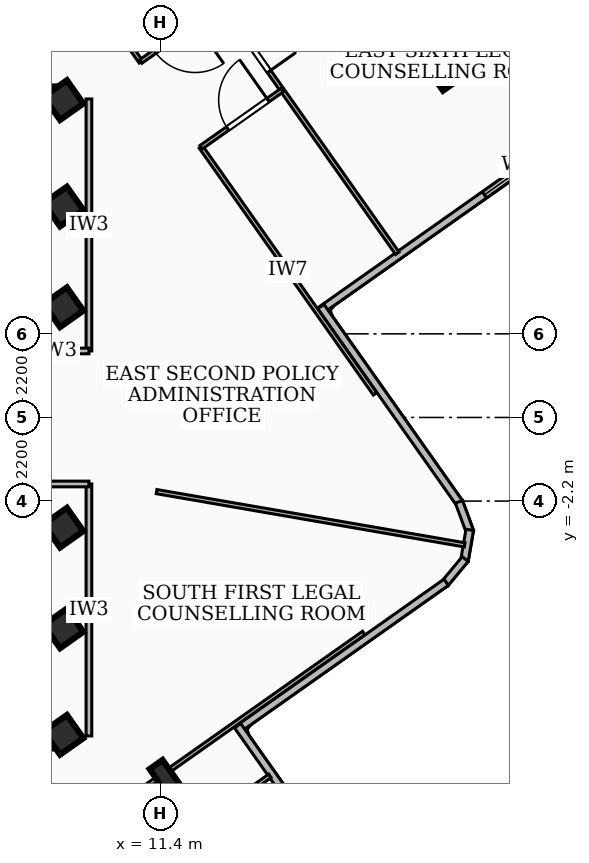
"""IFC4 building model, lengths in metres.
Left out: names, types, materials, properties, quantities, classifications, styles, units other than length and angle.
Written with IfcOpenShell. Run it as: python <this file> out.ifc"""

import sys

from ifc_helpers import new_model, si_unit, direction, frame, frame_2d, origin, origin_2d, place, context, subcontext, project, spatial, rectangle, i_section, extrude, element, fill, save


model = new_model("IFC4")
c1 = context("Model", 3, precision=1e-05, world=origin(), true_north=direction((0.0, 1.0)))
c2 = subcontext(c1, "Body", "Model", "MODEL_VIEW")
j1 = project(units=[si_unit("LENGTHUNIT", "METRE"), si_unit("PLANEANGLEUNIT", "RADIAN")], contexts=[c1])
p1 = place(None, origin())
s1 = spatial("IfcSite", under=j1, at=p1, CompositionType="ELEMENT")
p2 = place(p1, origin())
s2 = spatial("IfcBuilding", under=s1, at=p2, CompositionType="ELEMENT")
p3 = place(p2, frame((0.0, 0.0, 225.72)))
s3 = spatial("IfcBuildingStorey", under=s2, at=p3, CompositionType="ELEMENT", Elevation=225.72)
for number, where, z_axis, x_axis in (
    (1, (-8.78, 8.51, 0.0), (0.0, 0.0, 1.0), (1.0, 0.0, 0.0)),
    (2, (8.78, -8.51, 0.0), (0.0, 0.0, 1.0), (-1.0, 0.0, 0.0)),
):
    element("IfcWall", number, at=place(p3, frame(where, z_axis=z_axis, x_axis=x_axis)), inside=s3, PredefinedType="SHEAR", context=c2, shape_type="SweptSolid", body=[
        extrude(rectangle(XDim=17.56, YDim=0.4, at=frame_2d((8.78, 0.0))), origin(), (0.0, 0.0, 1.0), 3.14),
    ])
for number, where, z_axis, x_axis in (
    (3, (8.85, -5.55, 0.0), (0.0, 0.0, 1.0), (0.817, 0.576, 0.0)),
    (4, (8.85, -2.9, 0.0), (0.0, 0.0, 1.0), (0.817, 0.576, 0.0)),
    (5, (8.85, 2.9, 0.0), (0.0, 0.0, 1.0), (0.817, 0.576, 0.0)),
    (6, (8.85, 5.55, 0.0), (0.0, 0.0, 1.0), (0.817, 0.576, 0.0)),
    (7, (8.85, -8.35, 0.0), (0.0, 0.0, 1.0), (0.817, 0.576, 0.0)),
    (8, (8.85, 8.35, 0.0), (0.0, 0.0, 1.0), (0.817, 0.576, 0.0)),
):
    element("IfcColumn", number, at=place(p3, frame(where, z_axis=z_axis, x_axis=x_axis)), inside=s3, PredefinedType="COLUMN", context=c2, shape_type="SweptSolid", body=[
        extrude(rectangle(XDim=0.75, YDim=0.75, at=origin_2d()), origin(), (0.0, 0.0, 1.0), 3.42),
    ])
for number, where, z_axis, x_axis in (
    (9, (18.741, 9.097, 0.0), (0.0, 0.0, 1.0), (0.817, 0.576, 0.0)),
    (10, (11.554, -9.51, 0.0), (0.0, 0.0, 1.0), (0.817, 0.576, 0.0)),
):
    element("IfcColumn", number, at=place(p3, frame(where, z_axis=z_axis, x_axis=x_axis)), inside=s3, PredefinedType="COLUMN", context=c2, shape_type="SweptSolid", body=[
        extrude(i_section(OverallWidth=0.418, OverallDepth=0.927, WebThickness=0.019, FlangeThickness=0.032, at=origin_2d()), origin(), (0.0, 0.0, 1.0), 3.42),
    ])
p4 = place(p3, frame((22.829, 7.905, 0.0), z_axis=(0.0, 0.0, 1.0), x_axis=(-0.817135410946, -0.576445765166, 0.0)))
e11 = element("IfcWall", 11, at=p4, inside=s3, PredefinedType="SOLIDWALL", context=c2, shape_type="SweptSolid", body=[
    extrude(rectangle(XDim=8.842, YDim=0.2, at=frame_2d((4.421, 0.0))), origin(), (0.0, 0.0, 1.0), 3.14),
])
p5 = place(p4, frame((0.85, 0.0, 0.85)))
e12 = element("IfcOpeningElement", 12, at=p5, cuts=e11, PredefinedType="OPENING", context=c2, shape_type="SweptSolid", body=[
    extrude(rectangle(XDim=2.7, YDim=2.1, at=frame_2d((1.35, 1.05))), frame((0.0, 0.11, 0.0), z_axis=(0.0, -1.0, 0.0), x_axis=(1.0, 0.0, 0.0)), (0.0, 0.0, 1.0), 0.22),
])
p6 = place(p3, frame((15.623, 2.919, 0.0), z_axis=(0.0, 0.0, 1.0), x_axis=(0.576566796686, -0.817050016192, 0.0)))
e13 = element("IfcWall", 13, at=p6, inside=s3, PredefinedType="SOLIDWALL", context=c2, shape_type="SweptSolid", body=[
    extrude(rectangle(XDim=6.341, YDim=0.2, at=frame_2d((3.17, 0.0))), origin(), (0.0, 0.0, 1.0), 3.14),
])
p7 = place(p3, frame((19.256, -2.219, 0.0), z_axis=(0.0, 0.0, 1.0), x_axis=(0.345975487894, -0.938243551417, 0.0)))
e14 = element("IfcWall", 14, at=p7, inside=s3, PredefinedType="SOLIDWALL", context=c2, shape_type="SweptSolid", body=[
    extrude(rectangle(XDim=0.838, YDim=0.2, at=frame_2d((0.419, 0.0))), origin(), (0.0, 0.0, 1.0), 3.14),
])
p8 = place(p3, frame((19.541, -2.957, 0.0), z_axis=(0.0, 0.0, 1.0), x_axis=(-0.169867275979, -0.985466949497, 0.0)))
e15 = element("IfcWall", 15, at=p8, inside=s3, PredefinedType="SOLIDWALL", context=c2, shape_type="SweptSolid", body=[
    extrude(rectangle(XDim=0.825, YDim=0.2, at=frame_2d((0.413, 0.0))), origin(), (0.0, 0.0, 1.0), 3.14),
])
p9 = place(p3, frame((19.421, -3.726, 0.0), z_axis=(0.0, 0.0, 1.0), x_axis=(-0.639610986305, -0.768698761673, 0.0)))
e16 = element("IfcWall", 16, at=p9, inside=s3, PredefinedType="SOLIDWALL", context=c2, shape_type="SweptSolid", body=[
    extrude(rectangle(XDim=0.838, YDim=0.2, at=frame_2d((0.419, 0.0))), origin(), (0.0, 0.0, 1.0), 3.14),
])
p10 = place(p3, frame((18.921, -4.337, 0.0), z_axis=(0.0, 0.0, 1.0), x_axis=(-0.817167578816, -0.576400163196, 0.0)))
e17 = element("IfcWall", 17, at=p10, inside=s3, PredefinedType="SOLIDWALL", context=c2, shape_type="SweptSolid", body=[
    extrude(rectangle(XDim=6.74, YDim=0.2, at=frame_2d((3.37, 0.0))), origin(), (0.0, 0.0, 1.0), 3.14),
])
p11 = place(p3, frame((13.432, -8.111, 0.0), z_axis=(0.0, 0.0, 1.0), x_axis=(0.576445639344, -0.817135499707, 0.0)))
e18 = element("IfcWall", 18, at=p11, inside=s3, PredefinedType="SOLIDWALL", context=c2, shape_type="SweptSolid", body=[
    extrude(rectangle(XDim=4.641, YDim=0.2, at=frame_2d((2.32, 0.0))), origin(), (0.0, 0.0, 1.0), 3.14),
])
p12 = place(p3, frame((9.52, 1.75, 0.0), z_axis=(0.0, 0.0, 1.0), x_axis=(0.0, 1.0, 0.0)))
e19 = element("IfcWall", 19, at=p12, inside=s3, PredefinedType="PARTITIONING", context=c2, shape_type="SweptSolid", body=[
    extrude(rectangle(XDim=6.63, YDim=0.15, at=frame_2d((3.315, 0.0))), origin(), (0.0, 0.0, 1.0), 2.51),
])
p13 = place(p3, frame((7.85, 1.75, 0.0), z_axis=(0.0, 0.0, 1.0), x_axis=(1.0, 0.0, 0.0)))
e20 = element("IfcWall", 20, at=p13, inside=s3, PredefinedType="PARTITIONING", context=c2, shape_type="SweptSolid", body=[
    extrude(rectangle(XDim=1.67, YDim=0.15, at=frame_2d((0.835, 0.0))), origin(), (0.0, 0.0, 1.0), 2.37),
])
p14 = place(p3, frame((9.52, -8.38, 0.0), z_axis=(0.0, 0.0, 1.0), x_axis=(0.0, 1.0, 0.0)))
e21 = element("IfcWall", 21, at=p14, inside=s3, PredefinedType="PARTITIONING", context=c2, shape_type="SweptSolid", body=[
    extrude(rectangle(XDim=6.63, YDim=0.15, at=frame_2d((3.315, 0.0))), origin(), (0.0, 0.0, 1.0), 3.14),
])
p15 = place(p3, frame((7.85, -1.75, 0.0), z_axis=(0.0, 0.0, 1.0), x_axis=(1.0, 0.0, 0.0)))
e22 = element("IfcWall", 22, at=p15, inside=s3, PredefinedType="PARTITIONING", context=c2, shape_type="SweptSolid", body=[
    extrude(rectangle(XDim=1.67, YDim=0.15, at=frame_2d((0.835, 0.0))), origin(), (0.0, 0.0, 1.0), 2.37),
])
p16 = place(p3, frame((11.3, -1.951, 0.0), z_axis=(0.0, 0.0, 1.0), x_axis=(0.985391330126, -0.170305391905, 0.0)))
e23 = element("IfcWall", 23, at=p16, inside=s3, PredefinedType="PARTITIONING", context=c2, shape_type="SweptSolid", body=[
    extrude(rectangle(XDim=8.227, YDim=0.11, at=frame_2d((4.114, 0.0))), origin(), (0.0, 0.0, 1.0), 3.14),
])
p17 = place(p3, frame((10.887, 9.357, 0.0), z_axis=(0.0, 0.0, 1.0), x_axis=(-0.576423728743, 0.817150956031, 0.0)))
e24 = element("IfcWall", 24, at=p17, inside=s3, PredefinedType="PARTITIONING", context=c2, shape_type="SweptSolid", body=[
    extrude(rectangle(XDim=8.35, YDim=0.11, at=frame_2d((4.175, 0.0))), origin(), (0.0, 0.0, 1.0), 2.51),
])
p18 = place(p3, frame((17.049, 0.621, 0.0), z_axis=(0.0, 0.0, 1.0), x_axis=(-0.57635038395, 0.817202689007, 0.0)))
e25 = element("IfcWall", 25, at=p18, inside=s3, PredefinedType="PARTITIONING", context=c2, shape_type="SweptSolid", body=[
    extrude(rectangle(XDim=7.95, YDim=0.11, at=frame_2d((3.975, 0.0))), origin(), (0.0, 0.0, 1.0), 3.14),
])
p19 = place(p3, frame((13.014, 10.869, 0.0), z_axis=(0.0, 0.0, 1.0), x_axis=(-0.817133808286, -0.576448036995, 0.0)))
e26 = element("IfcWall", 26, at=p19, inside=s3, PredefinedType="PARTITIONING", context=c2, shape_type="SweptSolid", body=[
    extrude(rectangle(XDim=2.609, YDim=0.11, at=frame_2d((1.304, 0.0))), origin(), (0.0, 0.0, 1.0), 3.14),
])
p20 = place(p19, frame((0.854, 0.0, 0.0)))
e27 = element("IfcOpeningElement", 27, at=p20, cuts=e26, PredefinedType="OPENING", context=c2, shape_type="SweptSolid", body=[
    extrude(rectangle(XDim=1.3, YDim=2.1, at=frame_2d((0.65, 1.05))), frame((0.0, 0.065, 0.0), z_axis=(0.0, -1.0, 0.0), x_axis=(1.0, 0.0, 0.0)), (0.0, 0.0, 1.0), 0.13),
])
p21 = place(p3, frame((12.472, 7.11, 0.0), z_axis=(0.0, 0.0, 1.0), x_axis=(0.81728919746, 0.576227704745, 0.0)))
e28 = element("IfcWall", 28, at=p21, inside=s3, PredefinedType="PARTITIONING", context=c2, shape_type="SweptSolid", body=[
    extrude(rectangle(XDim=2.61, YDim=0.11, at=frame_2d((1.305, 0.0))), origin(), (0.0, 0.0, 1.0), 3.14),
])
p22 = place(p21, frame((0.855, 0.0, 0.0)))
e29 = element("IfcOpeningElement", 29, at=p22, cuts=e28, PredefinedType="OPENING", context=c2, shape_type="SweptSolid", body=[
    extrude(rectangle(XDim=1.3, YDim=2.1, at=frame_2d((0.65, 1.05))), frame((0.0, 0.065, 0.0), z_axis=(0.0, -1.0, 0.0), x_axis=(1.0, 0.0, 0.0)), (0.0, 0.0, 1.0), 0.13),
])
p23 = place(p3, frame((10.215, 14.836, 0.0), z_axis=(0.0, 0.0, 1.0), x_axis=(0.576525296339, -0.817079300118, 0.0)))
e30 = element("IfcWall", 30, at=p23, inside=s3, PredefinedType="PARTITIONING", context=c2, shape_type="SweptSolid", body=[
    extrude(rectangle(XDim=12.87, YDim=0.11, at=frame_2d((6.435, 0.0))), origin(), (0.0, 0.0, 1.0), 2.51),
])
p24 = place(p23, frame((6.155, 0.0, 0.0)))
e31 = element("IfcOpeningElement", 31, at=p24, cuts=e30, PredefinedType="OPENING", context=c2, shape_type="SweptSolid", body=[
    extrude(rectangle(XDim=0.86, YDim=2.04, at=frame_2d((0.43, 1.02))), frame((0.0, 0.065, 0.0), z_axis=(0.0, -1.0, 0.0), x_axis=(1.0, 0.0, 0.0)), (0.0, 0.0, 1.0), 0.13),
])
p25 = place(p23, frame((4.955, 0.0, 0.0)))
e32 = element("IfcOpeningElement", 32, at=p25, cuts=e30, PredefinedType="OPENING", context=c2, shape_type="SweptSolid", body=[
    extrude(rectangle(XDim=0.86, YDim=2.04, at=frame_2d((0.43, 1.02))), frame((0.0, 0.065, 0.0), z_axis=(0.0, -1.0, 0.0), x_axis=(1.0, 0.0, 0.0)), (0.0, 0.0, 1.0), 0.13),
])
p26 = place(p3, frame((16.752, -5.671, 0.0), z_axis=(0.0, 0.0, 1.0), x_axis=(-0.81715881447, -0.576412588285, 0.0)))
e33 = element("IfcWall", 33, at=p26, inside=s3, PredefinedType="PARTITIONING", context=c2, shape_type="SweptSolid", body=[
    extrude(rectangle(XDim=20.44, YDim=0.11, at=frame_2d((10.22, 0.0))), origin(), (0.0, 0.0, 1.0), 2.51),
])
p27 = place(p26, frame((9.82, 0.0, 0.0)))
e34 = element("IfcOpeningElement", 34, at=p27, cuts=e33, PredefinedType="OPENING", context=c2, shape_type="SweptSolid", body=[
    extrude(rectangle(XDim=1.2, YDim=2.1, at=frame_2d((0.6, 1.05))), frame((0.0, 0.065, 0.0), z_axis=(0.0, -1.0, 0.0), x_axis=(1.0, 0.0, 0.0)), (0.0, 0.0, 1.0), 0.13),
])
p28 = place(p3, frame((3.766, -16.85, 0.0), z_axis=(0.0, 0.0, 1.0), x_axis=(0.817131323803, 0.576451558815, 0.0)))
e35 = element("IfcWall", 35, at=p28, inside=s3, PredefinedType="PARTITIONING", context=c2, shape_type="SweptSolid", body=[
    extrude(rectangle(XDim=12.87, YDim=0.11, at=frame_2d((6.435, 0.0))), origin(), (0.0, 0.0, 1.0), 2.51),
])
p29 = place(p28, frame((6.185, 0.0, 0.0)))
e36 = element("IfcOpeningElement", 36, at=p29, cuts=e35, PredefinedType="OPENING", context=c2, shape_type="SweptSolid", body=[
    extrude(rectangle(XDim=0.86, YDim=2.04, at=frame_2d((0.43, 1.02))), frame((0.0, 0.065, 0.0), z_axis=(0.0, -1.0, 0.0), x_axis=(1.0, 0.0, 0.0)), (0.0, 0.0, 1.0), 0.13),
])
p30 = place(p28, frame((7.625, 0.0, 0.0)))
e37 = element("IfcOpeningElement", 37, at=p30, cuts=e35, PredefinedType="OPENING", context=c2, shape_type="SweptSolid", body=[
    extrude(rectangle(XDim=0.86, YDim=2.04, at=frame_2d((0.43, 1.02))), frame((0.0, 0.065, 0.0), z_axis=(0.0, -1.0, 0.0), x_axis=(1.0, 0.0, 0.0)), (0.0, 0.0, 1.0), 0.13),
])
p31 = place(p5, origin())
e38 = element("IfcWindow", 38, at=p31, inside=s3, PartitioningType="SINGLE_PANEL", PredefinedType="WINDOW", context=c2, shape_type="SweptSolid", body=[
    extrude(rectangle(XDim=2.7, YDim=2.1, at=frame_2d((1.35, 1.05))), frame((0.0, 0.03, 0.0), z_axis=(0.0, -1.0, 0.0), x_axis=(1.0, 0.0, 0.0)), (0.0, 0.0, 1.0), 0.06),
])
fill(e12, e38)
p32 = place(p20, origin())
e39 = element("IfcDoor", 39, at=p32, inside=s3, OperationType="SINGLE_SWING_LEFT", PredefinedType="DOOR", context=c2, shape_type="SweptSolid", body=[
    extrude(rectangle(XDim=1.3, YDim=2.1, at=frame_2d((0.65, 1.05))), frame((0.0, 0.025, 0.0), z_axis=(0.0, -1.0, 0.0), x_axis=(1.0, 0.0, 0.0)), (0.0, 0.0, 1.0), 0.05),
])
fill(e27, e39)
p33 = place(p22, origin())
e40 = element("IfcDoor", 40, at=p33, inside=s3, OperationType="SINGLE_SWING_RIGHT", PredefinedType="DOOR", context=c2, shape_type="SweptSolid", body=[
    extrude(rectangle(XDim=1.3, YDim=2.1, at=frame_2d((0.65, 1.05))), frame((0.0, 0.025, 0.0), z_axis=(0.0, -1.0, 0.0), x_axis=(1.0, 0.0, 0.0)), (0.0, 0.0, 1.0), 0.05),
])
fill(e29, e40)
p34 = place(p24, origin())
e41 = element("IfcDoor", 41, at=p34, inside=s3, OperationType="SINGLE_SWING_RIGHT", PredefinedType="DOOR", context=c2, shape_type="SweptSolid", body=[
    extrude(rectangle(XDim=0.86, YDim=2.04, at=frame_2d((0.43, 1.02))), frame((0.0, 0.025, 0.0), z_axis=(0.0, -1.0, 0.0), x_axis=(1.0, 0.0, 0.0)), (0.0, 0.0, 1.0), 0.05),
])
fill(e31, e41)
save(model, sys.argv[1])
